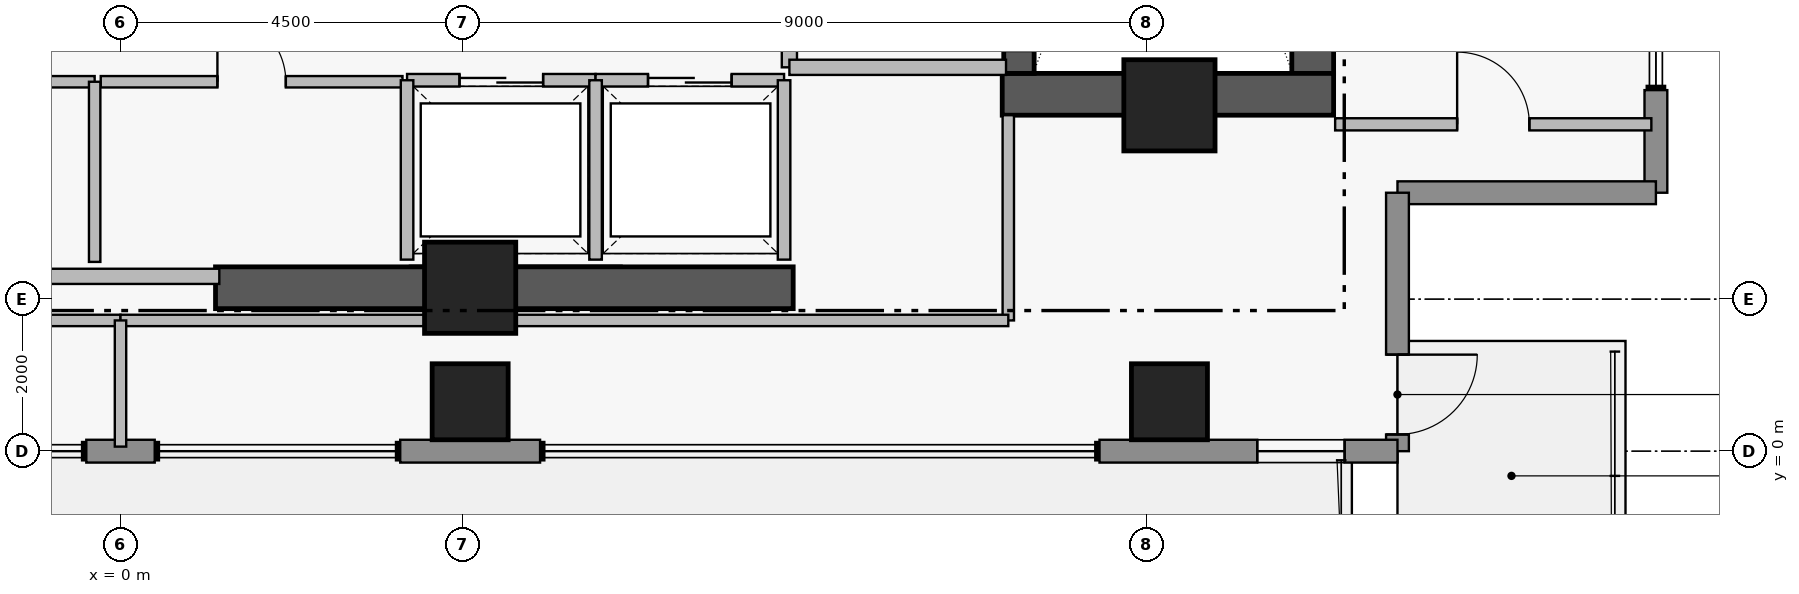
"""IFC4 building model, lengths in metres.
Left out: names, types, materials, properties, quantities, classifications, styles, units other than length and angle.
Written with IfcOpenShell. Run it as: python <this file> out.ifc"""

import sys

from ifc_helpers import new_model, si_unit, direction, frame, frame_2d, origin, origin_2d, place, context, subcontext, project, spatial, rectangle, extrude, element, fill, save


model = new_model("IFC4")
c1 = context("Model", 3, precision=1e-05, world=origin(), true_north=direction((0.0, 1.0)))
c2 = subcontext(c1, "Body", "Model", "MODEL_VIEW")
j1 = project(units=[si_unit("LENGTHUNIT", "METRE"), si_unit("PLANEANGLEUNIT", "RADIAN")], contexts=[c1])
p1 = place(None, origin())
s1 = spatial("IfcSite", under=j1, at=p1, CompositionType="ELEMENT")
p2 = place(p1, origin())
s2 = spatial("IfcBuilding", under=s1, at=p2, CompositionType="ELEMENT")
p3 = place(p2, frame((0.0, 0.0, 288.45)))
s3 = spatial("IfcBuildingStorey", under=s2, at=p3, CompositionType="ELEMENT", Elevation=288.45)
p4 = place(p3, frame((15.685, 4.97, 0.0), z_axis=(0.0, 0.0, 1.0), x_axis=(0.0, 1.0, 0.0)))
e1 = element("IfcWall", 1, at=p4, inside=s3, PredefinedType="SHEAR", context=c2, shape_type="SweptSolid", body=[
    extrude(rectangle(XDim=8.96, YDim=0.55, at=frame_2d((4.48, 0.0))), origin(), (0.0, 0.0, 1.0), 4.21),
])
p5 = place(p3, frame((11.6, 4.695, 0.0), z_axis=(0.0, 0.0, 1.0), x_axis=(1.0, 0.0, 0.0)))
e2 = element("IfcWall", 2, at=p5, inside=s3, PredefinedType="SHEAR", context=c2, shape_type="SweptSolid", body=[
    extrude(rectangle(XDim=4.36, YDim=0.55, at=frame_2d((2.18, 0.0))), origin(), (0.0, 0.0, 1.0), 4.21),
])
p6 = place(p3, frame((1.25, 2.15, 0.0), z_axis=(0.0, 0.0, 1.0), x_axis=(1.0, 0.0, 0.0)))
e3 = element("IfcWall", 3, at=p6, inside=s3, PredefinedType="SHEAR", context=c2, shape_type="SweptSolid", body=[
    extrude(rectangle(XDim=7.6, YDim=0.55, at=frame_2d((3.8, 0.0))), origin(), (0.0, 0.0, 1.0), 4.18),
])
p7 = place(p3, frame((11.82, 13.93, 0.0), z_axis=(0.0, 0.0, 1.0), x_axis=(0.0, -1.0, 0.0)))
e4 = element("IfcWall", 4, at=p7, inside=s3, PredefinedType="SHEAR", context=c2, shape_type="SweptSolid", body=[
    extrude(rectangle(XDim=8.96, YDim=0.4, at=frame_2d((4.48, 0.0))), origin(), (0.0, 0.0, 1.0), 4.21),
])
p8 = place(p7, frame((7.53, 0.0, 0.0)))
e5 = element("IfcOpeningElement", 5, at=p8, cuts=e4, PredefinedType="OPENING", context=c2, shape_type="SweptSolid", body=[
    extrude(rectangle(XDim=1.12, YDim=2.22, at=frame_2d((0.56, 1.11))), frame((0.0, 0.21, 0.0), z_axis=(0.0, -1.0, 0.0), x_axis=(1.0, 0.0, 0.0)), (0.0, 0.0, 1.0), 0.42),
])
for number, where, z_axis, x_axis in (
    (6, (4.6, 2.15, 0.0), (0.0, 0.0, 1.0), (1.0, 0.0, 0.0)),
    (7, (13.8, 4.55, 0.0), (0.0, 0.0, 1.0), (1.0, 0.0, 0.0)),
):
    element("IfcColumn", number, at=place(p3, frame(where, z_axis=z_axis, x_axis=x_axis)), inside=s3, PredefinedType="COLUMN", context=c2, shape_type="SweptSolid", body=[
        extrude(rectangle(XDim=1.2, YDim=1.2, at=origin_2d()), origin(), (0.0, 0.0, 1.0), 4.4),
    ])
for number, where, z_axis, x_axis in (
    (8, (4.6, 0.65, 0.0), (0.0, 0.0, 1.0), (1.0, 0.0, 0.0)),
    (9, (13.8, 0.65, 0.0), (0.0, 0.0, 1.0), (1.0, 0.0, 0.0)),
):
    element("IfcColumn", number, at=place(p3, frame(where, z_axis=z_axis, x_axis=x_axis)), inside=s3, PredefinedType="COLUMN", context=c2, shape_type="SweptSolid", body=[
        extrude(rectangle(XDim=1.0, YDim=1.0, at=origin_2d()), origin(), (0.0, 0.0, 1.0), 4.4),
    ])
p9 = place(p3, frame((20.2, 4.75, 0.0), z_axis=(0.0, 0.0, 1.0), x_axis=(0.0, -1.0, 0.0)))
e10 = element("IfcWall", 10, at=p9, inside=s3, PredefinedType="STANDARD", context=c2, shape_type="SweptSolid", body=[
    extrude(rectangle(XDim=1.35, YDim=0.3, at=frame_2d((0.675, 0.0))), origin(), (0.0, 0.0, 1.0), 4.18),
])
p10 = place(p3, frame((20.2, 3.4, 0.0), z_axis=(0.0, 0.0, 1.0), x_axis=(-1.0, 0.0, 0.0)))
e11 = element("IfcWall", 11, at=p10, inside=s3, PredefinedType="STANDARD", context=c2, shape_type="SweptSolid", body=[
    extrude(rectangle(XDim=3.4, YDim=0.3, at=frame_2d((1.7, 0.0))), origin(), (0.0, 0.0, 1.0), 4.18),
])
p11 = place(p3, frame((16.8, 3.4, 0.0), z_axis=(0.0, 0.0, 1.0), x_axis=(0.0, -1.0, 0.0)))
e12 = element("IfcWall", 12, at=p11, inside=s3, PredefinedType="STANDARD", context=c2, shape_type="SweptSolid", body=[
    extrude(rectangle(XDim=3.4, YDim=0.3, at=frame_2d((1.7, 0.0))), origin(), (0.0, 0.0, 1.0), 4.18),
])
p12 = place(p11, frame((2.13, 0.0, 0.0)))
e13 = element("IfcOpeningElement", 13, at=p12, cuts=e12, PredefinedType="OPENING", context=c2, shape_type="SweptSolid", body=[
    extrude(rectangle(XDim=1.05, YDim=2.2, at=frame_2d((0.525, 1.1))), frame((0.0, 0.16, 0.0), z_axis=(0.0, -1.0, 0.0), x_axis=(1.0, 0.0, 0.0)), (0.0, 0.0, 1.0), 0.32),
])
p13 = place(p3, frame((16.8, 0.0, 0.0), z_axis=(0.0, 0.0, 1.0), x_axis=(-1.0, 0.0, 0.0)))
e14 = element("IfcWall", 14, at=p13, inside=s3, PredefinedType="STANDARD", context=c2, shape_type="SweptSolid", body=[
    extrude(rectangle(XDim=3.92, YDim=0.3, at=frame_2d((1.96, 0.0))), origin(), (0.0, 0.0, 1.0), 4.18),
])
p14 = place(p13, frame((0.695, 0.0, 0.95)))
e15 = element("IfcOpeningElement", 15, at=p14, cuts=e14, PredefinedType="OPENING", context=c2, shape_type="SweptSolid", body=[
    extrude(rectangle(XDim=1.15, YDim=1.55, at=frame_2d((0.575, 0.775))), frame((0.0, 0.16, 0.0), z_axis=(0.0, -1.0, 0.0), x_axis=(1.0, 0.0, 0.0)), (0.0, 0.0, 1.0), 0.32),
])
p15 = place(p3, frame((5.52, 0.0, 0.0), z_axis=(0.0, 0.0, 1.0), x_axis=(-1.0, 0.0, 0.0)))
e16 = element("IfcWall", 16, at=p15, inside=s3, PredefinedType="STANDARD", context=c2, shape_type="SweptSolid", body=[
    extrude(rectangle(XDim=1.84, YDim=0.3, at=frame_2d((0.92, 0.0))), origin(), (0.0, 0.0, 1.0), 4.18),
])
p16 = place(p3, frame((0.45, 0.0, 0.0), z_axis=(0.0, 0.0, 1.0), x_axis=(-1.0, 0.0, 0.0)))
e17 = element("IfcWall", 17, at=p16, inside=s3, PredefinedType="STANDARD", context=c2, shape_type="SweptSolid", body=[
    extrude(rectangle(XDim=0.9, YDim=0.3, at=frame_2d((0.45, 0.0))), origin(), (0.0, 0.0, 1.0), 4.18),
])
p17 = place(p3, frame((8.8, 11.15, 0.0), z_axis=(0.0, 0.0, 1.0), x_axis=(0.0, -1.0, 0.0)))
e18 = element("IfcWall", 18, at=p17, inside=s3, PredefinedType="PARTITIONING", context=c2, shape_type="SweptSolid", body=[
    extrude(rectangle(XDim=6.1, YDim=0.2, at=frame_2d((3.05, 0.0))), origin(), (0.0, 0.0, 1.0), 4.18),
])
p18 = place(p17, frame((1.15, 0.0, 0.0)))
e19 = element("IfcOpeningElement", 19, at=p18, cuts=e18, PredefinedType="OPENING", context=c2, shape_type="SweptSolid", body=[
    extrude(rectangle(XDim=1.1, YDim=2.2, at=frame_2d((0.55, 1.1))), frame((0.0, 0.11, 0.0), z_axis=(0.0, -1.0, 0.0), x_axis=(1.0, 0.0, 0.0)), (0.0, 0.0, 1.0), 0.22),
])
p19 = place(p17, frame((4.75, 0.0, 0.0)))
e20 = element("IfcOpeningElement", 20, at=p19, cuts=e18, PredefinedType="OPENING", context=c2, shape_type="SweptSolid", body=[
    extrude(rectangle(XDim=1.1, YDim=2.2, at=frame_2d((0.55, 1.1))), frame((0.0, 0.11, 0.0), z_axis=(0.0, -1.0, 0.0), x_axis=(1.0, 0.0, 0.0)), (0.0, 0.0, 1.0), 0.22),
])
p20 = place(p3, frame((3.77, 4.88, 0.0), z_axis=(0.0, 0.0, 1.0), x_axis=(1.0, 0.0, 0.0)))
e21 = element("IfcWall", 21, at=p20, inside=s3, PredefinedType="PARTITIONING", context=c2, shape_type="SweptSolid", body=[
    extrude(rectangle(XDim=2.48, YDim=0.165, at=frame_2d((1.24, 0.0))), origin(), (0.0, 0.0, 1.0), 4.18),
])
p21 = place(p20, frame((0.69, 0.0, 0.0)))
e22 = element("IfcOpeningElement", 22, at=p21, cuts=e21, PredefinedType="OPENING", context=c2, shape_type="SweptSolid", body=[
    extrude(rectangle(XDim=1.1, YDim=2.25, at=frame_2d((0.55, 1.125))), frame((0.0, 0.093, 0.0), z_axis=(0.0, -1.0, 0.0), x_axis=(1.0, 0.0, 0.0)), (0.0, 0.0, 1.0), 0.185),
])
p22 = place(p3, frame((6.25, 4.88, 0.0), z_axis=(0.0, 0.0, 1.0), x_axis=(1.0, 0.0, 0.0)))
e23 = element("IfcWall", 23, at=p22, inside=s3, PredefinedType="PARTITIONING", context=c2, shape_type="SweptSolid", body=[
    extrude(rectangle(XDim=2.48, YDim=0.165, at=frame_2d((1.24, 0.0))), origin(), (0.0, 0.0, 1.0), 4.18),
])
p23 = place(p22, frame((0.69, 0.0, 0.0)))
e24 = element("IfcOpeningElement", 24, at=p23, cuts=e23, PredefinedType="OPENING", context=c2, shape_type="SweptSolid", body=[
    extrude(rectangle(XDim=1.1, YDim=2.25, at=frame_2d((0.55, 1.125))), frame((0.0, 0.093, 0.0), z_axis=(0.0, -1.0, 0.0), x_axis=(1.0, 0.0, 0.0)), (0.0, 0.0, 1.0), 0.185),
])
p24 = place(p3, frame((-8.71, 4.86, 0.0), z_axis=(0.0, 0.0, 1.0), x_axis=(1.0, 0.0, 0.0)))
e25 = element("IfcWall", 25, at=p24, inside=s3, PredefinedType="PARTITIONING", context=c2, shape_type="SweptSolid", body=[
    extrude(rectangle(XDim=8.37, YDim=0.15, at=frame_2d((4.185, 0.0))), origin(), (0.0, 0.0, 1.0), 4.18),
])
p25 = place(p24, frame((3.735, 0.0, 0.0)))
e26 = element("IfcOpeningElement", 26, at=p25, cuts=e25, PredefinedType="OPENING", context=c2, shape_type="SweptSolid", body=[
    extrude(rectangle(XDim=0.9, YDim=2.15, at=frame_2d((0.45, 1.075))), frame((0.0, 0.085, 0.0), z_axis=(0.0, -1.0, 0.0), x_axis=(1.0, 0.0, 0.0)), (0.0, 0.0, 1.0), 0.17),
])
p26 = place(p3, frame((-0.26, 4.86, 0.0), z_axis=(0.0, 0.0, 1.0), x_axis=(1.0, 0.0, 0.0)))
e27 = element("IfcWall", 27, at=p26, inside=s3, PredefinedType="PARTITIONING", context=c2, shape_type="SweptSolid", body=[
    extrude(rectangle(XDim=3.97, YDim=0.15, at=frame_2d((1.985, 0.0))), origin(), (0.0, 0.0, 1.0), 4.18),
])
p27 = place(p26, frame((1.535, 0.0, 0.0)))
e28 = element("IfcOpeningElement", 28, at=p27, cuts=e27, PredefinedType="OPENING", context=c2, shape_type="SweptSolid", body=[
    extrude(rectangle(XDim=0.9, YDim=2.15, at=frame_2d((0.45, 1.075))), frame((0.0, 0.085, 0.0), z_axis=(0.0, -1.0, 0.0), x_axis=(1.0, 0.0, 0.0)), (0.0, 0.0, 1.0), 0.17),
])
p28 = place(p3, frame((15.98, 4.3, 0.0), z_axis=(0.0, 0.0, 1.0), x_axis=(1.0, 0.0, 0.0)))
e29 = element("IfcWall", 29, at=p28, inside=s3, PredefinedType="PARTITIONING", context=c2, shape_type="SweptSolid", body=[
    extrude(rectangle(XDim=4.16, YDim=0.16, at=frame_2d((2.08, 0.0))), origin(), (0.0, 0.0, 1.0), 4.18),
])
p29 = place(p28, frame((1.605, 0.0, 0.0)))
e30 = element("IfcOpeningElement", 30, at=p29, cuts=e29, PredefinedType="OPENING", context=c2, shape_type="SweptSolid", body=[
    extrude(rectangle(XDim=0.95, YDim=2.15, at=frame_2d((0.475, 1.075))), frame((0.0, 0.09, 0.0), z_axis=(0.0, -1.0, 0.0), x_axis=(1.0, 0.0, 0.0)), (0.0, 0.0, 1.0), 0.18),
])
p30 = place(p3, frame((8.8, 5.05, 0.0), z_axis=(0.0, 0.0, 1.0), x_axis=(1.0, 0.0, 0.0)))
e31 = element("IfcWall", 31, at=p30, inside=s3, PredefinedType="PARTITIONING", context=c2, shape_type="SweptSolid", body=[
    extrude(rectangle(XDim=2.85, YDim=0.2, at=frame_2d((1.425, 0.0))), origin(), (0.0, 0.0, 1.0), 4.18),
])
for number, where, z_axis, x_axis in (
    (32, (3.77, 2.52, 0.0), (0.0, 0.0, 1.0), (0.0, 1.0, 0.0)),
    (33, (6.25, 2.52, 0.0), (0.0, 0.0, 1.0), (0.0, 1.0, 0.0)),
    (34, (8.73, 2.52, 0.0), (0.0, 0.0, 1.0), (0.0, 1.0, 0.0)),
):
    element("IfcWall", number, at=place(p3, frame(where, z_axis=z_axis, x_axis=x_axis)), inside=s3, PredefinedType="PARTITIONING", context=c2, shape_type="SweptSolid", body=[
        extrude(rectangle(XDim=2.36, YDim=0.165, at=frame_2d((1.18, 0.0))), origin(), (0.0, 0.0, 1.0), 4.18),
    ])
p31 = place(p3, frame((-1.3, 2.3, 0.0), z_axis=(0.0, 0.0, 1.0), x_axis=(1.0, 0.0, 0.0)))
e35 = element("IfcWall", 35, at=p31, inside=s3, PredefinedType="PARTITIONING", context=c2, shape_type="SweptSolid", body=[
    extrude(rectangle(XDim=2.6, YDim=0.2, at=frame_2d((1.3, 0.0))), origin(), (0.0, 0.0, 1.0), 3.08),
])
p32 = place(p3, frame((-0.34, 2.49, 0.0), z_axis=(0.0, 0.0, 1.0), x_axis=(0.0, 1.0, 0.0)))
e36 = element("IfcWall", 36, at=p32, inside=s3, PredefinedType="PARTITIONING", context=c2, shape_type="SweptSolid", body=[
    extrude(rectangle(XDim=2.37, YDim=0.15, at=frame_2d((1.185, 0.0))), origin(), (0.0, 0.0, 1.0), 4.18),
])
p33 = place(p3, frame((-11.68, 1.72, 0.0), z_axis=(0.0, 0.0, 1.0), x_axis=(1.0, 0.0, 0.0)))
e37 = element("IfcWall", 37, at=p33, inside=s3, PredefinedType="PARTITIONING", context=c2, shape_type="SweptSolid", body=[
    extrude(rectangle(XDim=11.68, YDim=0.15, at=frame_2d((5.84, 0.0))), origin(), (0.0, 0.0, 1.0), 3.08),
])
p34 = place(p3, frame((11.68, 1.72, 0.0), z_axis=(0.0, 0.0, 1.0), x_axis=(0.0, 1.0, 0.0)))
e38 = element("IfcWall", 38, at=p34, inside=s3, PredefinedType="PARTITIONING", context=c2, shape_type="SweptSolid", body=[
    extrude(rectangle(XDim=2.7, YDim=0.15, at=frame_2d((1.35, 0.0))), origin(), (0.0, 0.0, 1.0), 4.18),
])
p35 = place(p3, frame((0.0, 1.72, 0.0), z_axis=(0.0, 0.0, 1.0), x_axis=(1.0, 0.0, 0.0)))
e39 = element("IfcWall", 39, at=p35, inside=s3, PredefinedType="PARTITIONING", context=c2, shape_type="SweptSolid", body=[
    extrude(rectangle(XDim=11.68, YDim=0.15, at=frame_2d((5.84, 0.0))), origin(), (0.0, 0.0, 1.0), 3.08),
])
p36 = place(p3, frame((0.0, 0.06, 0.0), z_axis=(0.0, 0.0, 1.0), x_axis=(0.0, 1.0, 0.0)))
e40 = element("IfcWall", 40, at=p36, inside=s3, PredefinedType="PARTITIONING", context=c2, shape_type="SweptSolid", body=[
    extrude(rectangle(XDim=1.66, YDim=0.15, at=frame_2d((0.83, 0.0))), origin(), (0.0, 0.0, 1.0), 4.18),
])
p37 = place(p12, origin())
e41 = element("IfcDoor", 41, at=p37, inside=s3, OperationType="SINGLE_SWING_LEFT", PredefinedType="DOOR", context=c2, shape_type="SweptSolid", body=[
    extrude(rectangle(XDim=1.05, YDim=2.2, at=frame_2d((0.525, 1.1))), frame((0.0, 0.025, 0.0), z_axis=(0.0, -1.0, 0.0), x_axis=(1.0, 0.0, 0.0)), (0.0, 0.0, 1.0), 0.05),
])
fill(e13, e41)
p38 = place(p14, origin())
e42 = element("IfcWindow", 42, at=p38, inside=s3, PartitioningType="SINGLE_PANEL", PredefinedType="WINDOW", context=c2, shape_type="SweptSolid", body=[
    extrude(rectangle(XDim=1.15, YDim=1.55, at=frame_2d((0.575, 0.775))), frame((0.0, 0.03, 0.0), z_axis=(0.0, -1.0, 0.0), x_axis=(1.0, 0.0, 0.0)), (0.0, 0.0, 1.0), 0.06),
])
fill(e15, e42)
p39 = place(p21, origin())
e43 = element("IfcDoor", 43, at=p39, inside=s3, OperationType="SLIDING_TO_LEFT", PredefinedType="DOOR", context=c2, shape_type="SweptSolid", body=[
    extrude(rectangle(XDim=1.1, YDim=2.25, at=frame_2d((0.55, 1.125))), frame((0.0, 0.025, 0.0), z_axis=(0.0, -1.0, 0.0), x_axis=(1.0, 0.0, 0.0)), (0.0, 0.0, 1.0), 0.05),
])
fill(e22, e43)
p40 = place(p23, origin())
e44 = element("IfcDoor", 44, at=p40, inside=s3, OperationType="SLIDING_TO_LEFT", PredefinedType="DOOR", context=c2, shape_type="SweptSolid", body=[
    extrude(rectangle(XDim=1.1, YDim=2.25, at=frame_2d((0.55, 1.125))), frame((0.0, 0.025, 0.0), z_axis=(0.0, -1.0, 0.0), x_axis=(1.0, 0.0, 0.0)), (0.0, 0.0, 1.0), 0.05),
])
fill(e24, e44)
p41 = place(p27, origin())
e45 = element("IfcDoor", 45, at=p41, inside=s3, OperationType="SINGLE_SWING_LEFT", PredefinedType="DOOR", context=c2, shape_type="SweptSolid", body=[
    extrude(rectangle(XDim=0.9, YDim=2.15, at=frame_2d((0.45, 1.075))), frame((0.0, 0.025, 0.0), z_axis=(0.0, -1.0, 0.0), x_axis=(1.0, 0.0, 0.0)), (0.0, 0.0, 1.0), 0.05),
])
fill(e28, e45)
p42 = place(p29, origin())
e46 = element("IfcDoor", 46, at=p42, inside=s3, OperationType="SINGLE_SWING_LEFT", PredefinedType="DOOR", context=c2, shape_type="SweptSolid", body=[
    extrude(rectangle(XDim=0.95, YDim=2.15, at=frame_2d((0.475, 1.075))), frame((0.0, 0.025, 0.0), z_axis=(0.0, -1.0, 0.0), x_axis=(1.0, 0.0, 0.0)), (0.0, 0.0, 1.0), 0.05),
])
fill(e30, e46)
save(model, sys.argv[1])
